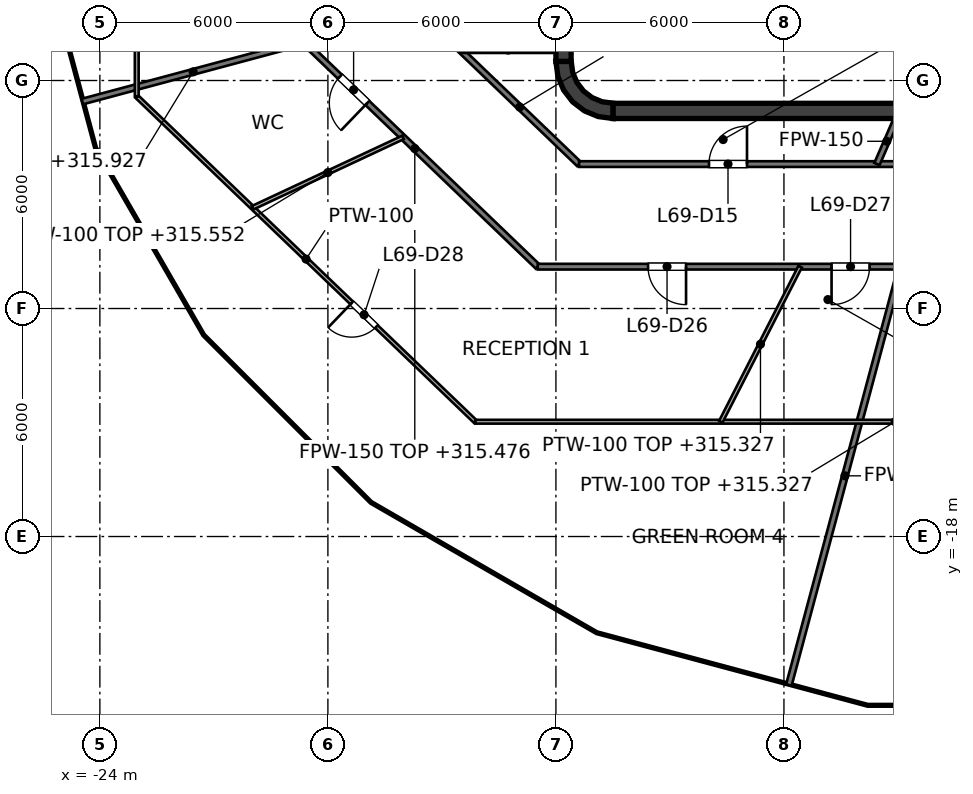
"""IFC4 building model, lengths in metres.
Left out: names, types, materials, properties, quantities, classifications, styles, units other than length and angle.
Written with IfcOpenShell. Run it as: python <this file> out.ifc"""

import sys

from ifc_helpers import new_model, si_unit, direction, frame, frame_2d, origin, place, context, subcontext, project, spatial, polyline, rectangle, outline, extrude, element, fill, save


model = new_model("IFC4")
c1 = context("Model", 3, precision=1e-05, world=origin(), true_north=direction((0.0, 1.0)))
c2 = subcontext(c1, "Body", "Model", "MODEL_VIEW")
j1 = project(units=[si_unit("LENGTHUNIT", "METRE"), si_unit("PLANEANGLEUNIT", "RADIAN")], contexts=[c1])
p1 = place(None, origin())
s1 = spatial("IfcSite", under=j1, at=p1, CompositionType="ELEMENT")
p2 = place(p1, origin())
s2 = spatial("IfcBuilding", under=s1, at=p2, CompositionType="ELEMENT")
p3 = place(p2, frame((0.0, 0.0, 312.4)))
s3 = spatial("IfcBuildingStorey", under=s2, at=p3, CompositionType="ELEMENT", Elevation=312.4)
p4 = place(p3, frame((-10.5, -6.8, 0.0), z_axis=(0.0, 0.0, 1.0), x_axis=(1.0, 0.0, 0.0)))
e1 = element("IfcWall", 1, at=p4, inside=s3, PredefinedType="SHEAR", context=c2, shape_type="SweptSolid", body=[
    extrude(rectangle(XDim=21.0, YDim=0.4, at=frame_2d((10.5, 0.0))), origin(), (0.0, 0.0, 1.0), 4.0),
])
p5 = place(p3, frame((-11.8, -5.5, 0.0), z_axis=(0.0, 0.0, 1.0), x_axis=(0.0, 1.0, 0.0)))
e2 = element("IfcWall", 2, at=p5, inside=s3, PredefinedType="SHEAR", context=c2, shape_type="SweptSolid", body=[
    extrude(rectangle(XDim=11.0, YDim=0.4, at=frame_2d((5.5, 0.0))), origin(), (0.0, 0.0, 1.0), 4.0),
])
p6 = place(p5, frame((5.0, 0.0, 0.0)))
e3 = element("IfcOpeningElement", 3, at=p6, cuts=e2, PredefinedType="OPENING", context=c2, shape_type="SweptSolid", body=[
    extrude(rectangle(XDim=1.0, YDim=2.1, at=frame_2d((0.5, 1.05))), frame((0.0, 0.2, 0.0), z_axis=(0.0, -1.0, 0.0), x_axis=(1.0, 0.0, 0.0)), (0.0, 0.0, 1.0), 0.4),
])
p7 = place(p5, frame((0.9, 0.0, 0.0)))
e4 = element("IfcOpeningElement", 4, at=p7, cuts=e2, PredefinedType="OPENING", context=c2, shape_type="SweptSolid", body=[
    extrude(rectangle(XDim=1.2, YDim=2.1, at=frame_2d((0.6, 1.05))), frame((0.0, 0.2, 0.0), z_axis=(0.0, -1.0, 0.0), x_axis=(1.0, 0.0, 0.0)), (0.0, 0.0, 1.0), 0.4),
])
p8 = place(p5, frame((8.9, 0.0, 0.0)))
e5 = element("IfcOpeningElement", 5, at=p8, cuts=e2, PredefinedType="OPENING", context=c2, shape_type="SweptSolid", body=[
    extrude(rectangle(XDim=1.2, YDim=2.1, at=frame_2d((0.6, 1.05))), frame((0.0, 0.2, 0.0), z_axis=(0.0, -1.0, 0.0), x_axis=(1.0, 0.0, 0.0)), (0.0, 0.0, 1.0), 0.4),
])
p9 = place(p3, origin())
e6 = element("IfcWall", 6, at=p9, inside=s3, PredefinedType="SHEAR", context=c2, shape_type="SweptSolid", body=[
    extrude(outline(polyline([(-10.5, -7.0), (-10.5, -6.596), (-10.784, -6.559), (-11.048, -6.45), (-11.275, -6.275), (-11.45, -6.048), (-11.559, -5.784), (-11.596, -5.5), (-12.0, -5.5), (-11.949, -5.888), (-11.799, -6.25), (-11.561, -6.561), (-11.25, -6.799), (-10.888, -6.949), (-10.5, -7.0)])), origin(), (0.0, 0.0, 1.0), 4.0),
])
p10 = place(p3, frame((-9.0, -6.6, 0.0), z_axis=(0.0, 0.0, 1.0), x_axis=(0.0, 1.0, 0.0)))
e7 = element("IfcWall", 7, at=p10, inside=s3, PredefinedType="PARTITIONING", context=c2, shape_type="SweptSolid", body=[
    extrude(rectangle(XDim=2.5, YDim=0.25, at=frame_2d((1.25, 0.0))), origin(), (0.0, 0.0, 1.0), 3.85),
])
p11 = place(p10, frame((0.75, 0.0, 0.0)))
e8 = element("IfcOpeningElement", 8, at=p11, cuts=e7, PredefinedType="OPENING", context=c2, shape_type="SweptSolid", body=[
    extrude(rectangle(XDim=1.0, YDim=2.1, at=frame_2d((0.5, 1.05))), frame((0.0, 0.125, 0.0), z_axis=(0.0, -1.0, 0.0), x_axis=(1.0, 0.0, 0.0)), (0.0, 0.0, 1.0), 0.25),
])
p12 = place(p3, frame((-18.95, -4.683, 0.0), z_axis=(0.0, 0.0, 1.0), x_axis=(0.721312831662, -0.692609412931, 0.0)))
e9 = element("IfcWall", 9, at=p12, inside=s3, PredefinedType="PARTITIONING", context=c2, shape_type="SweptSolid", body=[
    extrude(rectangle(XDim=8.973, YDim=0.15, at=frame_2d((4.487, 0.0))), origin(), (0.0, 0.0, 1.0), 3.076),
])
p13 = place(p12, frame((1.755, 0.0, 0.0)))
e10 = element("IfcOpeningElement", 10, at=p13, cuts=e9, PredefinedType="OPENING", context=c2, shape_type="SweptSolid", body=[
    extrude(rectangle(XDim=1.0, YDim=2.1, at=frame_2d((0.5, 1.05))), frame((0.0, 0.075, 0.0), z_axis=(0.0, -1.0, 0.0), x_axis=(1.0, 0.0, 0.0)), (0.0, 0.0, 1.0), 0.15),
])
p14 = place(p3, frame((-14.514, -5.2, 0.0), z_axis=(0.0, 0.0, 1.0), x_axis=(0.721283649967, -0.692639802704, 0.0)))
e11 = element("IfcWall", 11, at=p14, inside=s3, PredefinedType="PARTITIONING", context=c2, shape_type="SweptSolid", body=[
    extrude(rectangle(XDim=4.33, YDim=0.15, at=frame_2d((2.165, 0.0))), origin(), (0.0, 0.0, 1.0), 3.152),
])
p15 = place(p3, frame((-12.478, -10.899, 0.0), z_axis=(0.0, 0.0, 1.0), x_axis=(1.0, 0.0, 0.0)))
e12 = element("IfcWall", 12, at=p15, inside=s3, PredefinedType="PARTITIONING", context=c2, shape_type="SweptSolid", body=[
    extrude(rectangle(XDim=24.956, YDim=0.15, at=frame_2d((12.478, 0.0))), origin(), (0.0, 0.0, 1.0), 2.927),
])
p16 = place(p15, frame((2.902, 0.0, 0.0)))
e13 = element("IfcOpeningElement", 13, at=p16, cuts=e12, PredefinedType="OPENING", context=c2, shape_type="SweptSolid", body=[
    extrude(rectangle(XDim=1.0, YDim=2.1, at=frame_2d((0.5, 1.05))), frame((0.0, 0.075, 0.0), z_axis=(0.0, -1.0, 0.0), x_axis=(1.0, 0.0, 0.0)), (0.0, 0.0, 1.0), 0.15),
])
p17 = place(p15, frame((7.731, 0.0, 0.0)))
e14 = element("IfcOpeningElement", 14, at=p17, cuts=e12, PredefinedType="OPENING", context=c2, shape_type="SweptSolid", body=[
    extrude(rectangle(XDim=1.0, YDim=2.1, at=frame_2d((0.5, 1.05))), frame((0.0, 0.075, 0.0), z_axis=(0.0, -1.0, 0.0), x_axis=(1.0, 0.0, 0.0)), (0.0, 0.0, 1.0), 0.15),
])
p18 = place(p15, frame((16.707, 0.0, 0.0)))
e15 = element("IfcOpeningElement", 15, at=p18, cuts=e12, PredefinedType="OPENING", context=c2, shape_type="SweptSolid", body=[
    extrude(rectangle(XDim=1.0, YDim=2.1, at=frame_2d((0.5, 1.05))), frame((0.0, 0.075, 0.0), z_axis=(0.0, -1.0, 0.0), x_axis=(1.0, 0.0, 0.0)), (0.0, 0.0, 1.0), 0.15),
])
p19 = place(p3, frame((-11.391, -8.199, 0.0), z_axis=(0.0, 0.0, 1.0), x_axis=(1.0, 0.0, 0.0)))
e16 = element("IfcWall", 16, at=p19, inside=s3, PredefinedType="PARTITIONING", context=c2, shape_type="SweptSolid", body=[
    extrude(rectangle(XDim=22.782, YDim=0.15, at=frame_2d((11.391, 0.0))), origin(), (0.0, 0.0, 1.0), 2.927),
])
p20 = place(p19, frame((3.419, 0.0, 0.0)))
e17 = element("IfcOpeningElement", 17, at=p20, cuts=e16, PredefinedType="OPENING", context=c2, shape_type="SweptSolid", body=[
    extrude(rectangle(XDim=1.0, YDim=2.1, at=frame_2d((0.5, 1.05))), frame((0.0, 0.075, 0.0), z_axis=(0.0, -1.0, 0.0), x_axis=(1.0, 0.0, 0.0)), (0.0, 0.0, 1.0), 0.15),
])
p21 = place(p19, frame((10.841, 0.0, 0.0)))
e18 = element("IfcOpeningElement", 18, at=p21, cuts=e16, PredefinedType="OPENING", context=c2, shape_type="SweptSolid", body=[
    extrude(rectangle(XDim=1.0, YDim=2.1, at=frame_2d((0.5, 1.05))), frame((0.0, 0.075, 0.0), z_axis=(0.0, -1.0, 0.0), x_axis=(1.0, 0.0, 0.0)), (0.0, 0.0, 1.0), 0.15),
])
p22 = place(p19, frame((18.363, 0.0, 0.0)))
e19 = element("IfcOpeningElement", 19, at=p22, cuts=e16, PredefinedType="OPENING", context=c2, shape_type="SweptSolid", body=[
    extrude(rectangle(XDim=1.0, YDim=2.1, at=frame_2d((0.5, 1.05))), frame((0.0, 0.075, 0.0), z_axis=(0.0, -1.0, 0.0), x_axis=(1.0, 0.0, 0.0)), (0.0, 0.0, 1.0), 0.15),
])
p23 = place(p3, frame((-14.514, -5.2, 0.0), z_axis=(0.0, 0.0, 1.0), x_axis=(1.0, 0.0, 0.0)))
e20 = element("IfcWall", 20, at=p23, inside=s3, PredefinedType="PARTITIONING", context=c2, shape_type="SweptSolid", body=[
    extrude(rectangle(XDim=2.514, YDim=0.15, at=frame_2d((1.257, 0.0))), origin(), (0.0, 0.0, 1.0), 3.85),
])
p24 = place(p3, frame((-24.461, -6.554, 0.0), z_axis=(0.0, 0.0, 1.0), x_axis=(0.965890459785, 0.258950998638, 0.0)))
e21 = element("IfcWall", 21, at=p24, inside=s3, PredefinedType="PARTITIONING", context=c2, shape_type="SweptSolid", body=[
    extrude(rectangle(XDim=6.038, YDim=0.15, at=frame_2d((3.019, 0.0))), origin(), (0.0, 0.0, 1.0), 3.527),
])
p25 = place(p3, frame((-3.553, -8.199, 0.0), z_axis=(0.0, 0.0, 1.0), x_axis=(0.397906243356, 0.917426085033, 0.0)))
e22 = element("IfcWall", 22, at=p25, inside=s3, PredefinedType="PARTITIONING", context=c2, shape_type="SweptSolid", body=[
    extrude(rectangle(XDim=1.307, YDim=0.15, at=frame_2d((0.653, 0.0))), origin(), (0.0, 0.0, 1.0), 3.85),
])
p26 = place(p3, frame((-5.87, -21.907, 0.0), z_axis=(0.0, 0.0, 1.0), x_axis=(0.258847804171, 0.965918119861, 0.0)))
e23 = element("IfcWall", 23, at=p26, inside=s3, PredefinedType="PARTITIONING", context=c2, shape_type="SweptSolid", body=[
    extrude(rectangle(XDim=11.396, YDim=0.15, at=frame_2d((5.698, 0.0))), origin(), (0.0, 0.0, 1.0), 3.424),
])
p27 = place(p3, frame((-23.03, -6.421, 0.0), z_axis=(0.0, 0.0, 1.0), x_axis=(0.721337166522, -0.692584068684, 0.0)))
e24 = element("IfcWall", 24, at=p27, inside=s3, PredefinedType="PARTITIONING", context=c2, shape_type="SweptSolid", body=[
    extrude(rectangle(XDim=12.354, YDim=0.1, at=frame_2d((6.177, 0.0))), origin(), (0.0, 0.0, 1.0), 2.995),
])
p28 = place(p27, frame((7.843, 0.0, 0.0)))
e25 = element("IfcOpeningElement", 25, at=p28, cuts=e24, PredefinedType="OPENING", context=c2, shape_type="SweptSolid", body=[
    extrude(rectangle(XDim=0.9, YDim=2.1, at=frame_2d((0.45, 1.05))), frame((0.0, 0.05, 0.0), z_axis=(0.0, -1.0, 0.0), x_axis=(1.0, 0.0, 0.0)), (0.0, 0.0, 1.0), 0.1),
])
p29 = place(p3, frame((-14.12, -14.979, 0.0), z_axis=(0.0, 0.0, 1.0), x_axis=(1.0, 0.0, 0.0)))
e26 = element("IfcWall", 26, at=p29, inside=s3, PredefinedType="PARTITIONING", context=c2, shape_type="SweptSolid", body=[
    extrude(rectangle(XDim=22.089, YDim=0.1, at=frame_2d((11.044, 0.0))), origin(), (0.0, 0.0, 1.0), 2.927),
])
p30 = place(p29, frame((15.648, 0.0, 0.0)))
e27 = element("IfcOpeningElement", 27, at=p30, cuts=e26, PredefinedType="OPENING", context=c2, shape_type="SweptSolid", body=[
    extrude(rectangle(XDim=0.9, YDim=2.1, at=frame_2d((0.45, 1.05))), frame((0.0, 0.05, 0.0), z_axis=(0.0, -1.0, 0.0), x_axis=(1.0, 0.0, 0.0)), (0.0, 0.0, 1.0), 0.1),
])
p31 = place(p3, frame((-19.982, -9.349, 0.0), z_axis=(0.0, 0.0, 1.0), x_axis=(0.905780511999, 0.42374717, 0.0)))
e28 = element("IfcWall", 28, at=p31, inside=s3, PredefinedType="PARTITIONING", context=c2, shape_type="SweptSolid", body=[
    extrude(rectangle(XDim=4.373, YDim=0.1, at=frame_2d((2.187, 0.0))), origin(), (0.0, 0.0, 1.0), 3.152),
])
p32 = place(p3, frame((-7.661, -14.979, 0.0), z_axis=(0.0, 0.0, 1.0), x_axis=(0.455377612986, 0.890298393569, 0.0)))
e29 = element("IfcWall", 29, at=p32, inside=s3, PredefinedType="PARTITIONING", context=c2, shape_type="SweptSolid", body=[
    extrude(rectangle(XDim=4.583, YDim=0.1, at=frame_2d((2.292, 0.0))), origin(), (0.0, 0.0, 1.0), 2.927),
])
p33 = place(p3, frame((-23.03, -6.421, 0.0), z_axis=(0.0, 0.0, 1.0), x_axis=(0.0, 1.0, 0.0)))
e30 = element("IfcWall", 30, at=p33, inside=s3, PredefinedType="PARTITIONING", context=c2, shape_type="SweptSolid", body=[
    extrude(rectangle(XDim=12.842, YDim=0.1, at=frame_2d((6.421, 0.0))), origin(), (0.0, 0.0, 1.0), 2.995),
])
p34 = place(p33, frame((5.996, 0.0, 0.0)))
e31 = element("IfcOpeningElement", 31, at=p34, cuts=e30, PredefinedType="OPENING", context=c2, shape_type="SweptSolid", body=[
    extrude(rectangle(XDim=0.9, YDim=2.1, at=frame_2d((0.45, 1.05))), frame((0.0, 0.05, 0.0), z_axis=(0.0, -1.0, 0.0), x_axis=(1.0, 0.0, 0.0)), (0.0, 0.0, 1.0), 0.1),
])
p35 = place(p11, origin())
e32 = element("IfcDoor", 32, at=p35, inside=s3, OperationType="SINGLE_SWING_LEFT", PredefinedType="DOOR", context=c2, shape_type="SweptSolid", body=[
    extrude(rectangle(XDim=1.0, YDim=2.1, at=frame_2d((0.5, 1.05))), frame((0.0, 0.025, 0.0), z_axis=(0.0, -1.0, 0.0), x_axis=(1.0, 0.0, 0.0)), (0.0, 0.0, 1.0), 0.05),
])
fill(e8, e32)
p36 = place(p20, origin())
e33 = element("IfcDoor", 33, at=p36, inside=s3, OperationType="SINGLE_SWING_RIGHT", PredefinedType="DOOR", context=c2, shape_type="SweptSolid", body=[
    extrude(rectangle(XDim=1.0, YDim=2.1, at=frame_2d((0.5, 1.05))), frame((0.0, 0.025, 0.0), z_axis=(0.0, -1.0, 0.0), x_axis=(1.0, 0.0, 0.0)), (0.0, 0.0, 1.0), 0.05),
])
fill(e17, e33)
p37 = place(p13, origin())
e34 = element("IfcDoor", 34, at=p37, inside=s3, OperationType="SINGLE_SWING_RIGHT", PredefinedType="DOOR", context=c2, shape_type="SweptSolid", body=[
    extrude(rectangle(XDim=1.0, YDim=2.1, at=frame_2d((0.5, 1.05))), frame((0.0, 0.025, 0.0), z_axis=(0.0, -1.0, 0.0), x_axis=(1.0, 0.0, 0.0)), (0.0, 0.0, 1.0), 0.05),
])
fill(e10, e34)
p38 = place(p16, origin())
e35 = element("IfcDoor", 35, at=p38, inside=s3, OperationType="SINGLE_SWING_RIGHT", PredefinedType="DOOR", context=c2, shape_type="SweptSolid", body=[
    extrude(rectangle(XDim=1.0, YDim=2.1, at=frame_2d((0.5, 1.05))), frame((0.0, 0.025, 0.0), z_axis=(0.0, -1.0, 0.0), x_axis=(1.0, 0.0, 0.0)), (0.0, 0.0, 1.0), 0.05),
])
fill(e13, e35)
p39 = place(p17, origin())
e36 = element("IfcDoor", 36, at=p39, inside=s3, OperationType="SINGLE_SWING_LEFT", PredefinedType="DOOR", context=c2, shape_type="SweptSolid", body=[
    extrude(rectangle(XDim=1.0, YDim=2.1, at=frame_2d((0.5, 1.05))), frame((0.0, 0.025, 0.0), z_axis=(0.0, -1.0, 0.0), x_axis=(1.0, 0.0, 0.0)), (0.0, 0.0, 1.0), 0.05),
])
fill(e14, e36)
p40 = place(p28, origin())
e37 = element("IfcDoor", 37, at=p40, inside=s3, OperationType="SINGLE_SWING_LEFT", PredefinedType="DOOR", context=c2, shape_type="SweptSolid", body=[
    extrude(rectangle(XDim=0.9, YDim=2.1, at=frame_2d((0.45, 1.05))), frame((0.0, 0.025, 0.0), z_axis=(0.0, -1.0, 0.0), x_axis=(1.0, 0.0, 0.0)), (0.0, 0.0, 1.0), 0.05),
])
fill(e25, e37)
save(model, sys.argv[1])
